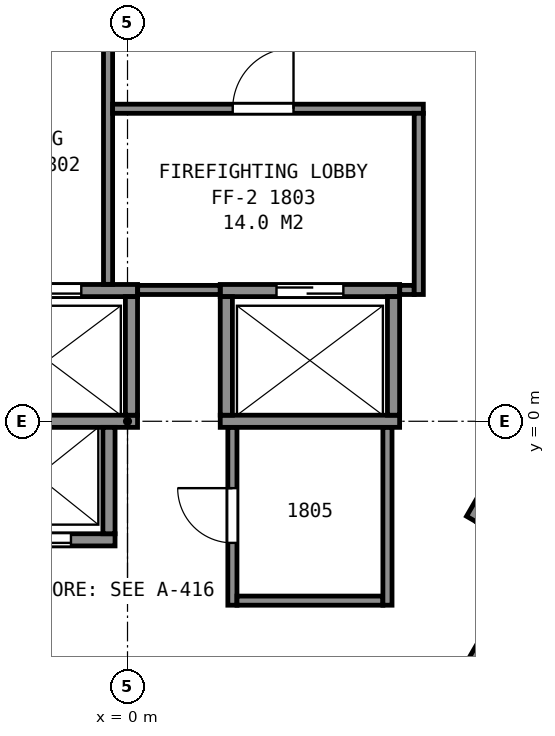
"""IFC4 building model, lengths in metres.
Left out: names, types, materials, properties, quantities, classifications, styles, units other than length and angle.
Written with IfcOpenShell. Run it as: python <this file> out.ifc"""

import sys

from ifc_helpers import new_model, si_unit, direction, frame, frame_2d, origin, place, context, subcontext, project, spatial, rectangle, extrude, element, fill, save


model = new_model("IFC4")
c1 = context("Model", 3, precision=1e-05, world=origin(), true_north=direction((0.0, 1.0)))
c2 = subcontext(c1, "Body", "Model", "MODEL_VIEW")
j1 = project(units=[si_unit("LENGTHUNIT", "METRE"), si_unit("PLANEANGLEUNIT", "RADIAN")], contexts=[c1])
p1 = place(None, origin())
s1 = spatial("IfcSite", under=j1, at=p1, CompositionType="ELEMENT")
p2 = place(p1, origin())
s2 = spatial("IfcBuilding", under=s1, at=p2, CompositionType="ELEMENT")
p3 = place(p2, frame((0.0, 0.0, 80.0)))
s3 = spatial("IfcBuildingStorey", under=s2, at=p3, CompositionType="ELEMENT", Elevation=80.0)
p4 = place(p3, frame((-2.755, -1.95, 0.0), z_axis=(0.0, 0.0, 1.0), x_axis=(1.0, 0.0, 0.0)))
e1 = element("IfcWall", 1, at=p4, inside=s3, PredefinedType="PARTITIONING", context=c2, shape_type="SweptSolid", body=[
    extrude(rectangle(XDim=2.55, YDim=0.2, at=frame_2d((1.275, 0.0))), origin(), (0.0, 0.0, 1.0), 3.6),
])
p5 = place(p4, frame((0.725, 0.0, 0.0)))
e2 = element("IfcOpeningElement", 2, at=p5, cuts=e1, PredefinedType="OPENING", context=c2, shape_type="SweptSolid", body=[
    extrude(rectangle(XDim=1.1, YDim=2.1, at=frame_2d((0.55, 1.05))), frame((0.0, 0.11, 0.0), z_axis=(0.0, -1.0, 0.0), x_axis=(1.0, 0.0, 0.0)), (0.0, 0.0, 1.0), 0.22),
])
p6 = place(p3, frame((-2.785, 0.0, 0.0), z_axis=(0.0, 0.0, 1.0), x_axis=(1.0, 0.0, 0.0)))
e3 = element("IfcWall", 3, at=p6, inside=s3, PredefinedType="PARTITIONING", context=c2, shape_type="SweptSolid", body=[
    extrude(rectangle(XDim=2.95, YDim=0.2, at=frame_2d((1.475, 0.0))), origin(), (0.0, 0.0, 1.0), 3.6),
])
p7 = place(p3, frame((1.525, 0.0, 0.0), z_axis=(0.0, 0.0, 1.0), x_axis=(1.0, 0.0, 0.0)))
e4 = element("IfcWall", 4, at=p7, inside=s3, PredefinedType="PARTITIONING", context=c2, shape_type="SweptSolid", body=[
    extrude(rectangle(XDim=2.95, YDim=0.2, at=frame_2d((1.475, 0.0))), origin(), (0.0, 0.0, 1.0), 3.6),
])
p8 = place(p3, frame((-2.785, 2.15, 0.0), z_axis=(0.0, 0.0, 1.0), x_axis=(1.0, 0.0, 0.0)))
e5 = element("IfcWall", 5, at=p8, inside=s3, PredefinedType="PARTITIONING", context=c2, shape_type="SweptSolid", body=[
    extrude(rectangle(XDim=2.95, YDim=0.2, at=frame_2d((1.475, 0.0))), origin(), (0.0, 0.0, 1.0), 3.6),
])
p9 = place(p8, frame((0.925, 0.0, 0.0)))
e6 = element("IfcOpeningElement", 6, at=p9, cuts=e5, PredefinedType="OPENING", context=c2, shape_type="SweptSolid", body=[
    extrude(rectangle(XDim=1.1, YDim=2.1, at=frame_2d((0.55, 1.05))), frame((0.0, 0.11, 0.0), z_axis=(0.0, -1.0, 0.0), x_axis=(1.0, 0.0, 0.0)), (0.0, 0.0, 1.0), 0.22),
])
p10 = place(p3, frame((1.525, 2.15, 0.0), z_axis=(0.0, 0.0, 1.0), x_axis=(1.0, 0.0, 0.0)))
e7 = element("IfcWall", 7, at=p10, inside=s3, PredefinedType="PARTITIONING", context=c2, shape_type="SweptSolid", body=[
    extrude(rectangle(XDim=2.95, YDim=0.2, at=frame_2d((1.475, 0.0))), origin(), (0.0, 0.0, 1.0), 3.6),
])
p11 = place(p10, frame((0.925, 0.0, 0.0)))
e8 = element("IfcOpeningElement", 8, at=p11, cuts=e7, PredefinedType="OPENING", context=c2, shape_type="SweptSolid", body=[
    extrude(rectangle(XDim=1.1, YDim=2.1, at=frame_2d((0.55, 1.05))), frame((0.0, 0.11, 0.0), z_axis=(0.0, -1.0, 0.0), x_axis=(1.0, 0.0, 0.0)), (0.0, 0.0, 1.0), 0.22),
])
p12 = place(p3, frame((5.527, -4.247, 0.0), z_axis=(0.0, 0.0, 1.0), x_axis=(0.499938297808, 0.866061024631, 0.0)))
e9 = element("IfcWall", 9, at=p12, inside=s3, PredefinedType="PARTITIONING", context=c2, shape_type="SweptSolid", body=[
    extrude(rectangle(XDim=2.35, YDim=0.2, at=frame_2d((1.175, 0.0))), origin(), (0.0, 0.0, 1.0), 3.6),
])
p13 = place(p12, frame((0.725, 0.0, 0.0)))
e10 = element("IfcOpeningElement", 10, at=p13, cuts=e9, PredefinedType="OPENING", context=c2, shape_type="SweptSolid", body=[
    extrude(rectangle(XDim=1.1, YDim=2.1, at=frame_2d((0.55, 1.05))), frame((0.0, 0.11, 0.0), z_axis=(0.0, -1.0, 0.0), x_axis=(1.0, 0.0, 0.0)), (0.0, 0.0, 1.0), 0.22),
])
p14 = place(p3, frame((5.663, -1.612, 0.0), z_axis=(0.0, 0.0, 1.0), x_axis=(0.49998122708, 0.866036242063, 0.0)))
e11 = element("IfcWall", 11, at=p14, inside=s3, PredefinedType="PARTITIONING", context=c2, shape_type="SweptSolid", body=[
    extrude(rectangle(XDim=4.9, YDim=0.2, at=frame_2d((2.45, 0.0))), origin(), (0.0, 0.0, 1.0), 3.6),
])
for number, where, z_axis, x_axis in (
    (12, (4.375, 0.1, 0.0), (0.0, 0.0, 1.0), (0.0, 1.0, 0.0)),
    (13, (1.625, 0.1, 0.0), (0.0, 0.0, 1.0), (0.0, 1.0, 0.0)),
    (14, (0.065, 0.1, 0.0), (0.0, 0.0, 1.0), (0.0, 1.0, 0.0)),
):
    element("IfcWall", number, at=place(p3, frame(where, z_axis=z_axis, x_axis=x_axis)), inside=s3, PredefinedType="PARTITIONING", context=c2, shape_type="SweptSolid", body=[
        extrude(rectangle(XDim=1.95, YDim=0.2, at=frame_2d((0.975, 0.0))), origin(), (0.0, 0.0, 1.0), 3.6),
    ])
p15 = place(p3, frame((-0.305, -1.85, 0.0), z_axis=(0.0, 0.0, 1.0), x_axis=(0.0, 1.0, 0.0)))
e15 = element("IfcWall", 15, at=p15, inside=s3, PredefinedType="PARTITIONING", context=c2, shape_type="SweptSolid", body=[
    extrude(rectangle(XDim=1.75, YDim=0.2, at=frame_2d((0.875, 0.0))), origin(), (0.0, 0.0, 1.0), 3.6),
])
p16 = place(p3, frame((-0.32, 2.252, 0.0), z_axis=(0.0, 0.0, 1.0), x_axis=(0.0, 1.0, 0.0)))
e16 = element("IfcWall", 16, at=p16, inside=s3, PredefinedType="PARTITIONING", context=c2, shape_type="SweptSolid", body=[
    extrude(rectangle(XDim=4.063, YDim=0.15, at=frame_2d((2.031, 0.0))), origin(), (0.0, 0.0, 1.0), 3.35),
])
p17 = place(p3, frame((-0.245, 5.14, 0.0), z_axis=(0.0, 0.0, 1.0), x_axis=(1.0, 0.0, 0.0)))
e17 = element("IfcWall", 17, at=p17, inside=s3, PredefinedType="PARTITIONING", context=c2, shape_type="SweptSolid", body=[
    extrude(rectangle(XDim=5.11, YDim=0.15, at=frame_2d((2.555, 0.0))), origin(), (0.0, 0.0, 1.0), 3.35),
])
p18 = place(p17, frame((1.975, 0.0, 0.0)))
e18 = element("IfcOpeningElement", 18, at=p18, cuts=e17, PredefinedType="OPENING", context=c2, shape_type="SweptSolid", body=[
    extrude(rectangle(XDim=1.0, YDim=2.1, at=frame_2d((0.5, 1.05))), frame((0.0, 0.085, 0.0), z_axis=(0.0, -1.0, 0.0), x_axis=(1.0, 0.0, 0.0)), (0.0, 0.0, 1.0), 0.17),
])
p19 = place(p3, frame((0.167, 2.16, 0.0), z_axis=(0.0, 0.0, 1.0), x_axis=(1.0, 0.0, 0.0)))
e19 = element("IfcWall", 19, at=p19, inside=s3, PredefinedType="PARTITIONING", context=c2, shape_type="SweptSolid", body=[
    extrude(rectangle(XDim=1.356, YDim=0.15, at=frame_2d((0.678, 0.0))), origin(), (0.0, 0.0, 1.0), 3.35),
])
p20 = place(p3, frame((1.725, -0.102, 0.0), z_axis=(0.0, 0.0, 1.0), x_axis=(0.0, -1.0, 0.0)))
e20 = element("IfcWall", 20, at=p20, inside=s3, PredefinedType="PARTITIONING", context=c2, shape_type="SweptSolid", body=[
    extrude(rectangle(XDim=2.923, YDim=0.15, at=frame_2d((1.461, 0.0))), origin(), (0.0, 0.0, 1.0), 3.35),
])
p21 = place(p20, frame((0.998, 0.0, 0.0)))
e21 = element("IfcOpeningElement", 21, at=p21, cuts=e20, PredefinedType="OPENING", context=c2, shape_type="SweptSolid", body=[
    extrude(rectangle(XDim=0.9, YDim=2.1, at=frame_2d((0.45, 1.05))), frame((0.0, 0.085, 0.0), z_axis=(0.0, -1.0, 0.0), x_axis=(1.0, 0.0, 0.0)), (0.0, 0.0, 1.0), 0.17),
])
p22 = place(p3, frame((1.8, -2.95, 0.0), z_axis=(0.0, 0.0, 1.0), x_axis=(1.0, 0.0, 0.0)))
e22 = element("IfcWall", 22, at=p22, inside=s3, PredefinedType="PARTITIONING", context=c2, shape_type="SweptSolid", body=[
    extrude(rectangle(XDim=2.4, YDim=0.15, at=frame_2d((1.2, 0.0))), origin(), (0.0, 0.0, 1.0), 3.35),
])
p23 = place(p3, frame((4.275, -3.025, 0.0), z_axis=(0.0, 0.0, 1.0), x_axis=(0.0, 1.0, 0.0)))
e23 = element("IfcWall", 23, at=p23, inside=s3, PredefinedType="PARTITIONING", context=c2, shape_type="SweptSolid", body=[
    extrude(rectangle(XDim=2.923, YDim=0.15, at=frame_2d((1.461, 0.0))), origin(), (0.0, 0.0, 1.0), 3.35),
])
p24 = place(p3, frame((4.477, 2.16, 0.0), z_axis=(0.0, 0.0, 1.0), x_axis=(1.0, 0.0, 0.0)))
e24 = element("IfcWall", 24, at=p24, inside=s3, PredefinedType="PARTITIONING", context=c2, shape_type="SweptSolid", body=[
    extrude(rectangle(XDim=0.238, YDim=0.15, at=frame_2d((0.119, 0.0))), origin(), (0.0, 0.0, 1.0), 3.35),
])
p25 = place(p3, frame((4.79, 2.085, 0.0), z_axis=(0.0, 0.0, 1.0), x_axis=(0.0, 1.0, 0.0)))
e25 = element("IfcWall", 25, at=p25, inside=s3, PredefinedType="PARTITIONING", context=c2, shape_type="SweptSolid", body=[
    extrude(rectangle(XDim=2.98, YDim=0.15, at=frame_2d((1.49, 0.0))), origin(), (0.0, 0.0, 1.0), 3.35),
])
p26 = place(p3, frame((19.456, 7.217, 0.0), z_axis=(0.0, 0.0, 1.0), x_axis=(-0.50002170027, -0.866012874765, 0.0)))
e26 = element("IfcWall", 26, at=p26, inside=s3, PredefinedType="PARTITIONING", context=c2, shape_type="SweptSolid", body=[
    extrude(rectangle(XDim=31.379, YDim=0.125, at=frame_2d((15.69, 0.0))), origin(), (0.0, 0.0, 1.0), 2.613),
])
p27 = place(p26, frame((26.843, 0.0, 0.0)))
e27 = element("IfcOpeningElement", 27, at=p27, cuts=e26, PredefinedType="OPENING", context=c2, shape_type="SweptSolid", body=[
    extrude(rectangle(XDim=1.0, YDim=2.1, at=frame_2d((0.5, 1.05))), frame((0.0, 0.073, 0.0), z_axis=(0.0, -1.0, 0.0), x_axis=(1.0, 0.0, 0.0)), (0.0, 0.0, 1.0), 0.145),
])
p28 = place(p26, frame((24.03, 0.0, 0.0)))
e28 = element("IfcOpeningElement", 28, at=p28, cuts=e26, PredefinedType="OPENING", context=c2, shape_type="SweptSolid", body=[
    extrude(rectangle(XDim=0.9, YDim=2.1, at=frame_2d((0.45, 1.05))), frame((0.0, 0.073, 0.0), z_axis=(0.0, -1.0, 0.0), x_axis=(1.0, 0.0, 0.0)), (0.0, 0.0, 1.0), 0.145),
])
p29 = place(p26, frame((17.159, 0.0, 0.0)))
e29 = element("IfcOpeningElement", 29, at=p29, cuts=e26, PredefinedType="OPENING", context=c2, shape_type="SweptSolid", body=[
    extrude(rectangle(XDim=0.9, YDim=2.1, at=frame_2d((0.45, 1.05))), frame((0.0, 0.073, 0.0), z_axis=(0.0, -1.0, 0.0), x_axis=(1.0, 0.0, 0.0)), (0.0, 0.0, 1.0), 0.145),
])
p30 = place(p26, frame((14.24, 0.0, 0.0)))
e30 = element("IfcOpeningElement", 30, at=p30, cuts=e26, PredefinedType="OPENING", context=c2, shape_type="SweptSolid", body=[
    extrude(rectangle(XDim=0.9, YDim=2.1, at=frame_2d((0.45, 1.05))), frame((0.0, 0.073, 0.0), z_axis=(0.0, -1.0, 0.0), x_axis=(1.0, 0.0, 0.0)), (0.0, 0.0, 1.0), 0.145),
])
p31 = place(p26, frame((6.997, 0.0, 0.0)))
e31 = element("IfcOpeningElement", 31, at=p31, cuts=e26, PredefinedType="OPENING", context=c2, shape_type="SweptSolid", body=[
    extrude(rectangle(XDim=0.9, YDim=2.1, at=frame_2d((0.45, 1.05))), frame((0.0, 0.073, 0.0), z_axis=(0.0, -1.0, 0.0), x_axis=(1.0, 0.0, 0.0)), (0.0, 0.0, 1.0), 0.145),
])
p32 = place(p26, frame((4.327, 0.0, 0.0)))
e32 = element("IfcOpeningElement", 32, at=p32, cuts=e26, PredefinedType="OPENING", context=c2, shape_type="SweptSolid", body=[
    extrude(rectangle(XDim=0.9, YDim=2.1, at=frame_2d((0.45, 1.05))), frame((0.0, 0.073, 0.0), z_axis=(0.0, -1.0, 0.0), x_axis=(1.0, 0.0, 0.0)), (0.0, 0.0, 1.0), 0.145),
])
p33 = place(p5, origin())
e33 = element("IfcDoor", 33, at=p33, inside=s3, OperationType="SLIDING_TO_RIGHT", PredefinedType="DOOR", context=c2, shape_type="SweptSolid", body=[
    extrude(rectangle(XDim=1.1, YDim=2.1, at=frame_2d((0.55, 1.05))), frame((0.0, 0.025, 0.0), z_axis=(0.0, -1.0, 0.0), x_axis=(1.0, 0.0, 0.0)), (0.0, 0.0, 1.0), 0.05),
])
fill(e2, e33)
p34 = place(p9, origin())
e34 = element("IfcDoor", 34, at=p34, inside=s3, OperationType="SLIDING_TO_LEFT", PredefinedType="DOOR", context=c2, shape_type="SweptSolid", body=[
    extrude(rectangle(XDim=1.1, YDim=2.1, at=frame_2d((0.55, 1.05))), frame((0.0, 0.025, 0.0), z_axis=(0.0, -1.0, 0.0), x_axis=(1.0, 0.0, 0.0)), (0.0, 0.0, 1.0), 0.05),
])
fill(e6, e34)
p35 = place(p11, origin())
e35 = element("IfcDoor", 35, at=p35, inside=s3, OperationType="SLIDING_TO_RIGHT", PredefinedType="DOOR", context=c2, shape_type="SweptSolid", body=[
    extrude(rectangle(XDim=1.1, YDim=2.1, at=frame_2d((0.55, 1.05))), frame((0.0, 0.025, 0.0), z_axis=(0.0, -1.0, 0.0), x_axis=(1.0, 0.0, 0.0)), (0.0, 0.0, 1.0), 0.05),
])
fill(e8, e35)
p36 = place(p18, origin())
e36 = element("IfcDoor", 36, at=p36, inside=s3, OperationType="SINGLE_SWING_RIGHT", PredefinedType="DOOR", context=c2, shape_type="SweptSolid", body=[
    extrude(rectangle(XDim=1.0, YDim=2.1, at=frame_2d((0.5, 1.05))), frame((0.0, 0.025, 0.0), z_axis=(0.0, -1.0, 0.0), x_axis=(1.0, 0.0, 0.0)), (0.0, 0.0, 1.0), 0.05),
])
fill(e18, e36)
p37 = place(p21, origin())
e37 = element("IfcDoor", 37, at=p37, inside=s3, OperationType="SINGLE_SWING_LEFT", PredefinedType="DOOR", context=c2, shape_type="SweptSolid", body=[
    extrude(rectangle(XDim=0.9, YDim=2.1, at=frame_2d((0.45, 1.05))), frame((0.0, 0.025, 0.0), z_axis=(0.0, -1.0, 0.0), x_axis=(1.0, 0.0, 0.0)), (0.0, 0.0, 1.0), 0.05),
])
fill(e21, e37)
save(model, sys.argv[1])
